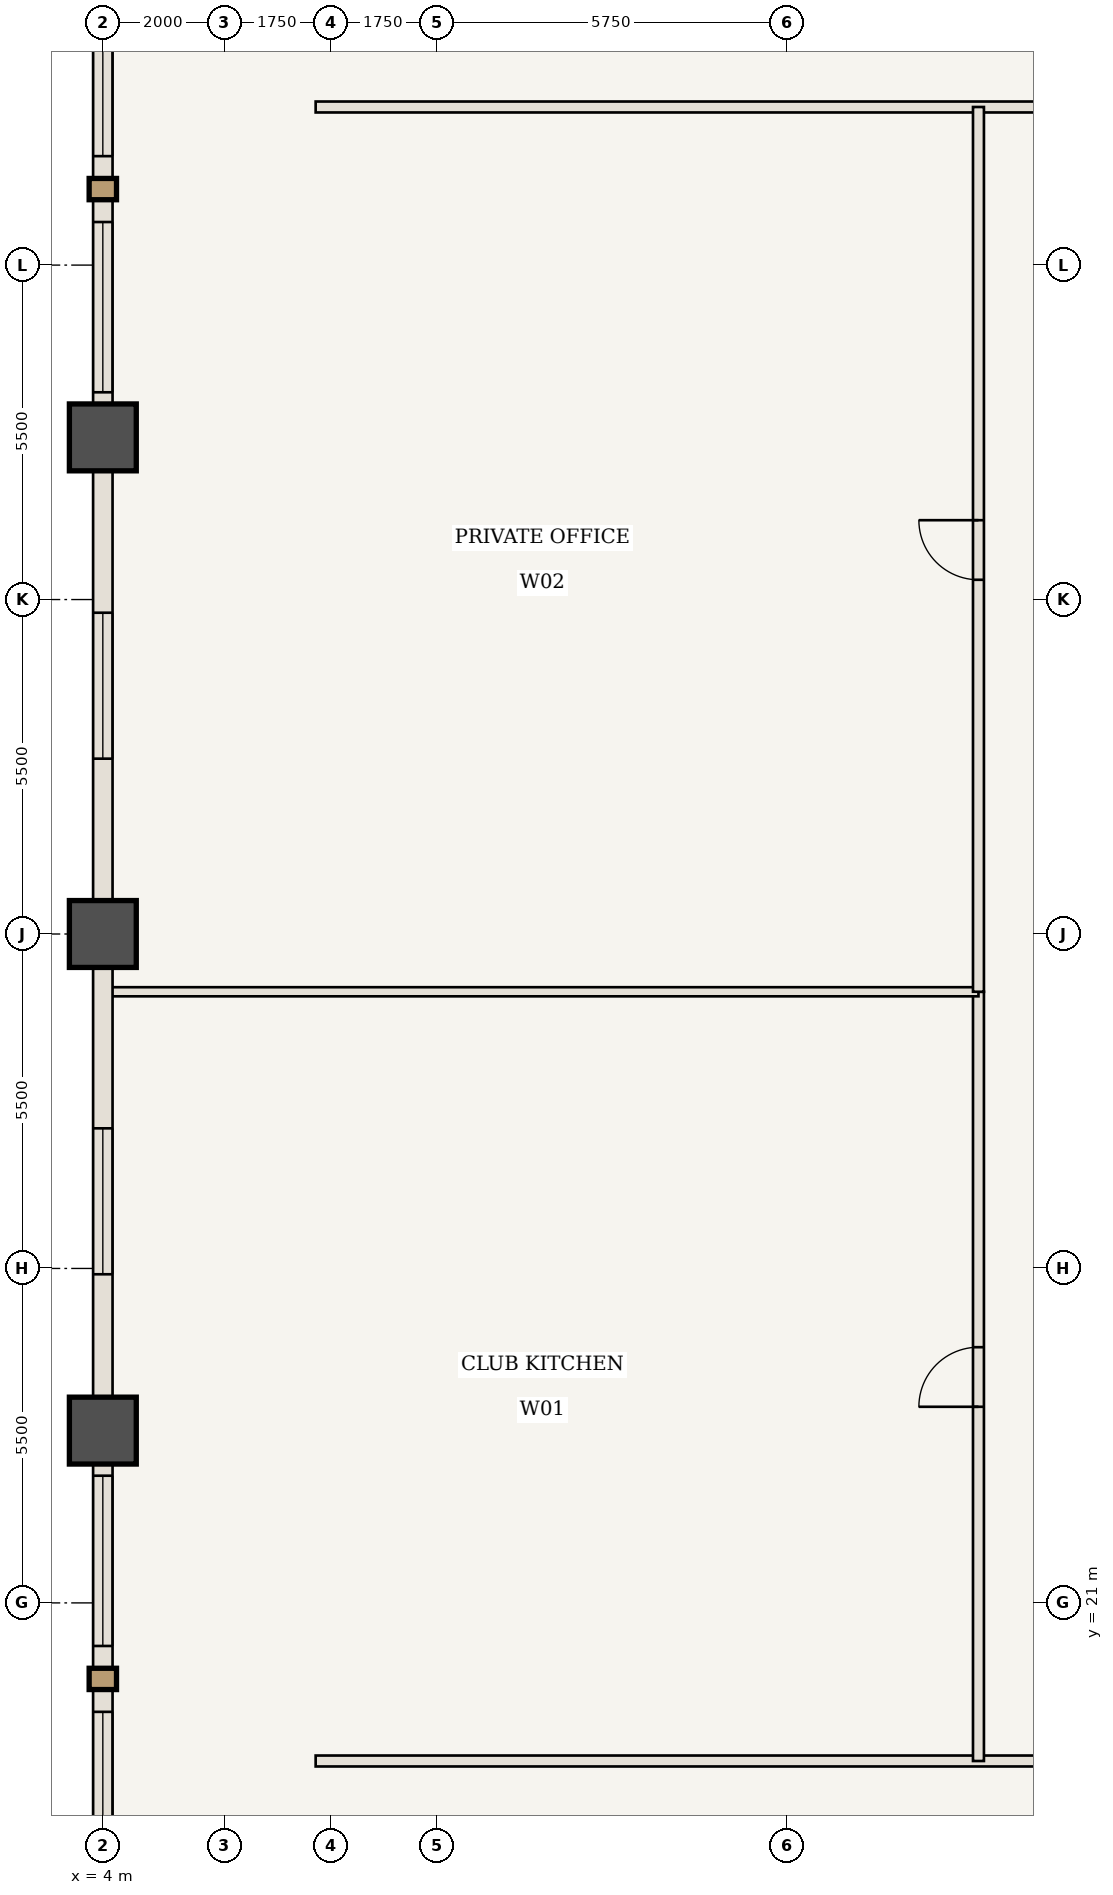
"""IFC4 building model, lengths in metres.
Left out: names, types, materials, properties, quantities, classifications, styles, units other than length and angle.
Written with IfcOpenShell. Run it as: python <this file> out.ifc"""

import sys

from ifc_helpers import new_model, si_unit, direction, frame, frame_2d, origin, origin_2d, place, context, subcontext, project, spatial, rectangle, extrude, element, fill, save


model = new_model("IFC4")
c1 = context("Model", 3, precision=1e-05, world=origin(), true_north=direction((0.0, 1.0)))
c2 = subcontext(c1, "Body", "Model", "MODEL_VIEW")
j1 = project(units=[si_unit("LENGTHUNIT", "METRE"), si_unit("PLANEANGLEUNIT", "RADIAN")], contexts=[c1])
p1 = place(None, origin())
s1 = spatial("IfcSite", under=j1, at=p1, CompositionType="ELEMENT")
p2 = place(p1, origin())
s2 = spatial("IfcBuilding", under=s1, at=p2, CompositionType="ELEMENT")
p3 = place(p2, frame((0.0, 0.0, 96.25)))
s3 = spatial("IfcBuildingStorey", under=s2, at=p3, CompositionType="ELEMENT", Elevation=96.25)
for number, where, z_axis, x_axis in (
    (1, (4.0, 23.833, 0.0), (0.0, 0.0, 1.0), (1.0, 0.0, 0.0)),
    (2, (4.0, 32.0, 0.0), (0.0, 0.0, 1.0), (1.0, 0.0, 0.0)),
    (3, (4.0, 40.167, 0.0), (0.0, 0.0, 1.0), (1.0, 0.0, 0.0)),
):
    element("IfcColumn", number, at=place(p3, frame(where, z_axis=z_axis, x_axis=x_axis)), inside=s3, PredefinedType="COLUMN", context=c2, shape_type="SweptSolid", body=[
        extrude(rectangle(XDim=1.1, YDim=1.1, at=origin_2d()), origin(), (0.0, 0.0, 1.0), 3.5),
    ])
p4 = place(p3, frame((7.5, 18.4, 0.0), z_axis=(0.0, 0.0, 1.0), x_axis=(1.0, 0.0, 0.0)))
e4 = element("IfcWall", 4, at=p4, inside=s3, PredefinedType="STANDARD", context=c2, shape_type="SweptSolid", body=[
    extrude(rectangle(XDim=31.717, YDim=0.18, at=frame_2d((15.858, 0.0))), origin(), (0.0, 0.0, 1.0), 3.08),
])
p5 = place(p4, frame((22.283, 0.0, 0.0)))
e5 = element("IfcOpeningElement", 5, at=p5, cuts=e4, PredefinedType="OPENING", context=c2, shape_type="SweptSolid", body=[
    extrude(rectangle(XDim=0.98, YDim=2.2, at=frame_2d((0.49, 1.1))), frame((0.0, 0.1, 0.0), z_axis=(0.0, -1.0, 0.0), x_axis=(1.0, 0.0, 0.0)), (0.0, 0.0, 1.0), 0.2),
])
p6 = place(p3, frame((7.5, 45.6, 0.0), z_axis=(0.0, 0.0, 1.0), x_axis=(1.0, 0.0, 0.0)))
e6 = element("IfcWall", 6, at=p6, inside=s3, PredefinedType="STANDARD", context=c2, shape_type="SweptSolid", body=[
    extrude(rectangle(XDim=15.383, YDim=0.18, at=frame_2d((7.692, 0.0))), origin(), (0.0, 0.0, 1.0), 3.08),
])
p7 = place(p6, frame((12.667, 0.0, 0.0)))
e7 = element("IfcOpeningElement", 7, at=p7, cuts=e6, PredefinedType="OPENING", context=c2, shape_type="SweptSolid", body=[
    extrude(rectangle(XDim=0.98, YDim=2.2, at=frame_2d((0.49, 1.1))), frame((0.0, 0.1, 0.0), z_axis=(0.0, -1.0, 0.0), x_axis=(1.0, 0.0, 0.0)), (0.0, 0.0, 1.0), 0.2),
])
p8 = place(p3, frame((18.4, 18.4, 0.0), z_axis=(0.0, 0.0, 1.0), x_axis=(0.0, 1.0, 0.0)))
e8 = element("IfcWall", 8, at=p8, inside=s3, PredefinedType="STANDARD", context=c2, shape_type="SweptSolid", body=[
    extrude(rectangle(XDim=12.65, YDim=0.18, at=frame_2d((6.325, 0.0))), origin(), (0.0, 0.0, 1.0), 3.08),
])
p9 = place(p8, frame((5.825, 0.0, 0.0)))
e9 = element("IfcOpeningElement", 9, at=p9, cuts=e8, PredefinedType="OPENING", context=c2, shape_type="SweptSolid", body=[
    extrude(rectangle(XDim=0.98, YDim=2.2, at=frame_2d((0.49, 1.1))), frame((0.0, 0.1, 0.0), z_axis=(0.0, -1.0, 0.0), x_axis=(1.0, 0.0, 0.0)), (0.0, 0.0, 1.0), 0.2),
])
p10 = place(p3, frame((4.06, 31.05, 0.0), z_axis=(0.0, 0.0, 1.0), x_axis=(1.0, 0.0, 0.0)))
e10 = element("IfcWall", 10, at=p10, inside=s3, PredefinedType="STANDARD", context=c2, shape_type="SweptSolid", body=[
    extrude(rectangle(XDim=14.34, YDim=0.15, at=frame_2d((7.17, 0.0))), origin(), (0.0, 0.0, 1.0), 3.08),
])
p11 = place(p3, frame((18.4, 31.05, 0.0), z_axis=(0.0, 0.0, 1.0), x_axis=(0.0, 1.0, 0.0)))
e11 = element("IfcWall", 11, at=p11, inside=s3, PredefinedType="STANDARD", context=c2, shape_type="SweptSolid", body=[
    extrude(rectangle(XDim=14.55, YDim=0.18, at=frame_2d((7.275, 0.0))), origin(), (0.0, 0.0, 1.0), 3.08),
])
p12 = place(p11, frame((6.775, 0.0, 0.0)))
e12 = element("IfcOpeningElement", 12, at=p12, cuts=e11, PredefinedType="OPENING", context=c2, shape_type="SweptSolid", body=[
    extrude(rectangle(XDim=0.98, YDim=2.2, at=frame_2d((0.49, 1.1))), frame((0.0, 0.1, 0.0), z_axis=(0.0, -1.0, 0.0), x_axis=(1.0, 0.0, 0.0)), (0.0, 0.0, 1.0), 0.2),
])
p13 = place(p3, frame((4.0, 15.667, 0.0), z_axis=(0.0, 0.0, 1.0), x_axis=(0.0, 1.0, 0.0)))
e13 = element("IfcWall", 13, at=p13, inside=s3, PredefinedType="USERDEFINED", context=c2, shape_type="SweptSolid", body=[
    extrude(rectangle(XDim=8.167, YDim=0.32, at=frame_2d((4.083, 0.0))), origin(), (0.0, 0.0, 1.0), 2.28),
])
p14 = place(p13, frame((0.742, 0.0, 0.85)))
e14 = element("IfcOpeningElement", 14, at=p14, cuts=e13, PredefinedType="OPENING", context=c2, shape_type="SweptSolid", body=[
    extrude(rectangle(XDim=2.8, YDim=1.23, at=frame_2d((1.4, 0.615))), frame((0.0, 0.17, 0.0), z_axis=(0.0, -1.0, 0.0), x_axis=(1.0, 0.0, 0.0)), (0.0, 0.0, 1.0), 0.34),
])
p15 = place(p13, frame((4.625, 0.0, 0.85)))
e15 = element("IfcOpeningElement", 15, at=p15, cuts=e13, PredefinedType="OPENING", context=c2, shape_type="SweptSolid", body=[
    extrude(rectangle(XDim=2.8, YDim=1.23, at=frame_2d((1.4, 0.615))), frame((0.0, 0.17, 0.0), z_axis=(0.0, -1.0, 0.0), x_axis=(1.0, 0.0, 0.0)), (0.0, 0.0, 1.0), 0.34),
])
p16 = place(p3, frame((4.0, 23.833, 0.0), z_axis=(0.0, 0.0, 1.0), x_axis=(0.0, 1.0, 0.0)))
e16 = element("IfcWall", 16, at=p16, inside=s3, PredefinedType="USERDEFINED", context=c2, shape_type="SweptSolid", body=[
    extrude(rectangle(XDim=8.167, YDim=0.32, at=frame_2d((4.083, 0.0))), origin(), (0.0, 0.0, 1.0), 2.28),
])
p17 = place(p16, frame((2.571, 0.0, 0.85)))
e17 = element("IfcOpeningElement", 17, at=p17, cuts=e16, PredefinedType="OPENING", context=c2, shape_type="SweptSolid", body=[
    extrude(rectangle(XDim=2.4, YDim=1.23, at=frame_2d((1.2, 0.615))), frame((0.0, 0.17, 0.0), z_axis=(0.0, -1.0, 0.0), x_axis=(1.0, 0.0, 0.0)), (0.0, 0.0, 1.0), 0.34),
])
p18 = place(p3, frame((4.0, 32.0, 0.0), z_axis=(0.0, 0.0, 1.0), x_axis=(0.0, 1.0, 0.0)))
e18 = element("IfcWall", 18, at=p18, inside=s3, PredefinedType="USERDEFINED", context=c2, shape_type="SweptSolid", body=[
    extrude(rectangle(XDim=8.167, YDim=0.32, at=frame_2d((4.083, 0.0))), origin(), (0.0, 0.0, 1.0), 2.28),
])
p19 = place(p18, frame((2.883, 0.0, 0.85)))
e19 = element("IfcOpeningElement", 19, at=p19, cuts=e18, PredefinedType="OPENING", context=c2, shape_type="SweptSolid", body=[
    extrude(rectangle(XDim=2.4, YDim=1.23, at=frame_2d((1.2, 0.615))), frame((0.0, 0.17, 0.0), z_axis=(0.0, -1.0, 0.0), x_axis=(1.0, 0.0, 0.0)), (0.0, 0.0, 1.0), 0.34),
])
p20 = place(p3, frame((4.0, 40.167, 0.0), z_axis=(0.0, 0.0, 1.0), x_axis=(0.0, 1.0, 0.0)))
e20 = element("IfcWall", 20, at=p20, inside=s3, PredefinedType="USERDEFINED", context=c2, shape_type="SweptSolid", body=[
    extrude(rectangle(XDim=8.167, YDim=0.32, at=frame_2d((4.083, 0.0))), origin(), (0.0, 0.0, 1.0), 2.28),
])
p21 = place(p20, frame((0.742, 0.0, 0.85)))
e21 = element("IfcOpeningElement", 21, at=p21, cuts=e20, PredefinedType="OPENING", context=c2, shape_type="SweptSolid", body=[
    extrude(rectangle(XDim=2.8, YDim=1.23, at=frame_2d((1.4, 0.615))), frame((0.0, 0.17, 0.0), z_axis=(0.0, -1.0, 0.0), x_axis=(1.0, 0.0, 0.0)), (0.0, 0.0, 1.0), 0.34),
])
p22 = place(p20, frame((4.625, 0.0, 0.85)))
e22 = element("IfcOpeningElement", 22, at=p22, cuts=e20, PredefinedType="OPENING", context=c2, shape_type="SweptSolid", body=[
    extrude(rectangle(XDim=2.8, YDim=1.23, at=frame_2d((1.4, 0.615))), frame((0.0, 0.17, 0.0), z_axis=(0.0, -1.0, 0.0), x_axis=(1.0, 0.0, 0.0)), (0.0, 0.0, 1.0), 0.34),
])
p23 = place(p9, origin())
e23 = element("IfcDoor", 23, at=p23, inside=s3, OperationType="SINGLE_SWING_LEFT", PredefinedType="DOOR", context=c2, shape_type="SweptSolid", body=[
    extrude(rectangle(XDim=0.98, YDim=2.2, at=frame_2d((0.49, 1.1))), frame((0.0, 0.025, 0.0), z_axis=(0.0, -1.0, 0.0), x_axis=(1.0, 0.0, 0.0)), (0.0, 0.0, 1.0), 0.05),
])
fill(e9, e23)
p24 = place(p12, origin())
e24 = element("IfcDoor", 24, at=p24, inside=s3, OperationType="SINGLE_SWING_RIGHT", PredefinedType="DOOR", context=c2, shape_type="SweptSolid", body=[
    extrude(rectangle(XDim=0.98, YDim=2.2, at=frame_2d((0.49, 1.1))), frame((0.0, 0.025, 0.0), z_axis=(0.0, -1.0, 0.0), x_axis=(1.0, 0.0, 0.0)), (0.0, 0.0, 1.0), 0.05),
])
fill(e12, e24)
p25 = place(p14, origin())
e25 = element("IfcWindow", 25, at=p25, inside=s3, PartitioningType="SINGLE_PANEL", PredefinedType="WINDOW", context=c2, shape_type="SweptSolid", body=[
    extrude(rectangle(XDim=2.8, YDim=1.23, at=frame_2d((1.4, 0.615))), frame((0.0, 0.03, 0.0), z_axis=(0.0, -1.0, 0.0), x_axis=(1.0, 0.0, 0.0)), (0.0, 0.0, 1.0), 0.06),
])
fill(e14, e25)
p26 = place(p15, origin())
e26 = element("IfcWindow", 26, at=p26, inside=s3, PartitioningType="SINGLE_PANEL", PredefinedType="WINDOW", context=c2, shape_type="SweptSolid", body=[
    extrude(rectangle(XDim=2.8, YDim=1.23, at=frame_2d((1.4, 0.615))), frame((0.0, 0.03, 0.0), z_axis=(0.0, -1.0, 0.0), x_axis=(1.0, 0.0, 0.0)), (0.0, 0.0, 1.0), 0.06),
])
fill(e15, e26)
p27 = place(p17, origin())
e27 = element("IfcWindow", 27, at=p27, inside=s3, PartitioningType="SINGLE_PANEL", PredefinedType="WINDOW", context=c2, shape_type="SweptSolid", body=[
    extrude(rectangle(XDim=2.4, YDim=1.23, at=frame_2d((1.2, 0.615))), frame((0.0, 0.03, 0.0), z_axis=(0.0, -1.0, 0.0), x_axis=(1.0, 0.0, 0.0)), (0.0, 0.0, 1.0), 0.06),
])
fill(e17, e27)
p28 = place(p19, origin())
e28 = element("IfcWindow", 28, at=p28, inside=s3, PartitioningType="SINGLE_PANEL", PredefinedType="WINDOW", context=c2, shape_type="SweptSolid", body=[
    extrude(rectangle(XDim=2.4, YDim=1.23, at=frame_2d((1.2, 0.615))), frame((0.0, 0.03, 0.0), z_axis=(0.0, -1.0, 0.0), x_axis=(1.0, 0.0, 0.0)), (0.0, 0.0, 1.0), 0.06),
])
fill(e19, e28)
p29 = place(p21, origin())
e29 = element("IfcWindow", 29, at=p29, inside=s3, PartitioningType="SINGLE_PANEL", PredefinedType="WINDOW", context=c2, shape_type="SweptSolid", body=[
    extrude(rectangle(XDim=2.8, YDim=1.23, at=frame_2d((1.4, 0.615))), frame((0.0, 0.03, 0.0), z_axis=(0.0, -1.0, 0.0), x_axis=(1.0, 0.0, 0.0)), (0.0, 0.0, 1.0), 0.06),
])
fill(e21, e29)
p30 = place(p22, origin())
e30 = element("IfcWindow", 30, at=p30, inside=s3, PartitioningType="SINGLE_PANEL", PredefinedType="WINDOW", context=c2, shape_type="SweptSolid", body=[
    extrude(rectangle(XDim=2.8, YDim=1.23, at=frame_2d((1.4, 0.615))), frame((0.0, 0.03, 0.0), z_axis=(0.0, -1.0, 0.0), x_axis=(1.0, 0.0, 0.0)), (0.0, 0.0, 1.0), 0.06),
])
fill(e22, e30)
save(model, sys.argv[1])
